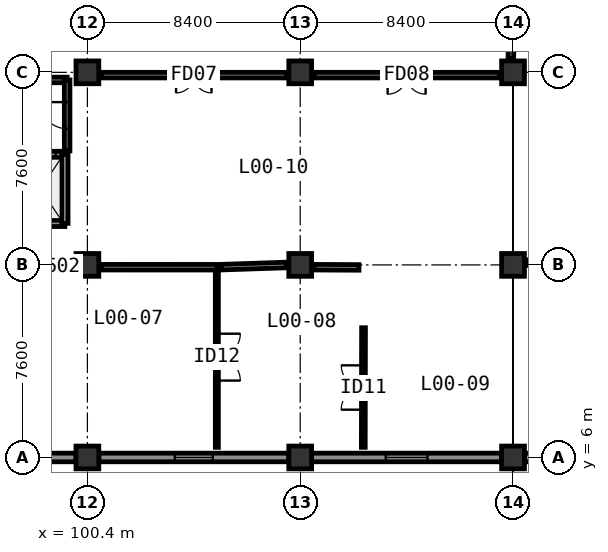
"""IFC4 building model, lengths in metres.
Left out: names, types, materials, properties, quantities, classifications, styles, units other than length and angle.
Written with IfcOpenShell. Run it as: python <this file> out.ifc"""

import sys

from ifc_helpers import new_model, si_unit, direction, frame, frame_2d, origin, origin_2d, place, context, subcontext, project, spatial, rectangle, extrude, element, fill, save


model = new_model("IFC4")
c1 = context("Model", 3, precision=1e-05, world=origin(), true_north=direction((0.0, 1.0)))
c2 = subcontext(c1, "Body", "Model", "MODEL_VIEW")
j1 = project(units=[si_unit("LENGTHUNIT", "METRE"), si_unit("PLANEANGLEUNIT", "RADIAN")], contexts=[c1])
p1 = place(None, origin())
s1 = spatial("IfcSite", under=j1, at=p1, CompositionType="ELEMENT")
p2 = place(p1, origin())
s2 = spatial("IfcBuilding", under=s1, at=p2, CompositionType="ELEMENT")
p3 = place(p2, origin())
s3 = spatial("IfcBuildingStorey", under=s2, at=p3, CompositionType="ELEMENT", Elevation=0.0)
for number, where, z_axis, x_axis in (
    (1, (100.4, 6.0, 0.0), (0.0, 0.0, 1.0), (1.0, 0.0, 0.0)),
    (2, (108.8, 6.0, 0.0), (0.0, 0.0, 1.0), (1.0, 0.0, 0.0)),
    (3, (117.2, 6.0, 0.0), (0.0, 0.0, 1.0), (1.0, 0.0, 0.0)),
    (4, (100.4, 13.6, 0.0), (0.0, 0.0, 1.0), (1.0, 0.0, 0.0)),
    (5, (108.8, 13.6, 0.0), (0.0, 0.0, 1.0), (1.0, 0.0, 0.0)),
    (6, (117.2, 13.6, 0.0), (0.0, 0.0, 1.0), (1.0, 0.0, 0.0)),
    (7, (100.4, 21.2, 0.0), (0.0, 0.0, 1.0), (1.0, 0.0, 0.0)),
    (8, (108.8, 21.2, 0.0), (0.0, 0.0, 1.0), (1.0, 0.0, 0.0)),
    (9, (117.2, 21.2, 0.0), (0.0, 0.0, 1.0), (1.0, 0.0, 0.0)),
):
    element("IfcColumn", number, at=place(p3, frame(where, z_axis=z_axis, x_axis=x_axis)), inside=s3, PredefinedType="COLUMN", context=c2, shape_type="SweptSolid", body=[
        extrude(rectangle(XDim=0.9, YDim=0.9, at=origin_2d()), origin(), (0.0, 0.0, 1.0), 4.8),
    ])
p4 = place(p3, frame((92.45, 6.0, 0.0), z_axis=(0.0, 0.0, 1.0), x_axis=(1.0, 0.0, 0.0)))
e10 = element("IfcWall", 10, at=p4, inside=s3, PredefinedType="SOLIDWALL", context=c2, shape_type="SweptSolid", body=[
    extrude(rectangle(XDim=7.5, YDim=0.34, at=frame_2d((3.75, 0.0))), origin(), (0.0, 0.0, 1.0), 4.5),
])
p5 = place(p4, frame((2.65, 0.0, 0.0)))
e11 = element("IfcOpeningElement", 11, at=p5, cuts=e10, PredefinedType="OPENING", context=c2, shape_type="SweptSolid", body=[
    extrude(rectangle(XDim=2.2, YDim=2.4, at=frame_2d((1.1, 1.2))), frame((0.0, 0.18, 0.0), z_axis=(0.0, -1.0, 0.0), x_axis=(1.0, 0.0, 0.0)), (0.0, 0.0, 1.0), 0.36),
])
p6 = place(p3, frame((100.85, 6.0, 0.0), z_axis=(0.0, 0.0, 1.0), x_axis=(1.0, 0.0, 0.0)))
e12 = element("IfcWall", 12, at=p6, inside=s3, PredefinedType="SOLIDWALL", context=c2, shape_type="SweptSolid", body=[
    extrude(rectangle(XDim=7.5, YDim=0.34, at=frame_2d((3.75, 0.0))), origin(), (0.0, 0.0, 1.0), 4.047),
])
p7 = place(p6, frame((3.0, 0.0, 0.95)))
e13 = element("IfcOpeningElement", 13, at=p7, cuts=e12, PredefinedType="OPENING", context=c2, shape_type="SweptSolid", body=[
    extrude(rectangle(XDim=1.5, YDim=1.5, at=frame_2d((0.75, 0.75))), frame((0.0, 0.18, 0.0), z_axis=(0.0, -1.0, 0.0), x_axis=(1.0, 0.0, 0.0)), (0.0, 0.0, 1.0), 0.36),
])
p8 = place(p3, frame((109.25, 6.0, 0.0), z_axis=(0.0, 0.0, 1.0), x_axis=(1.0, 0.0, 0.0)))
e14 = element("IfcWall", 14, at=p8, inside=s3, PredefinedType="SOLIDWALL", context=c2, shape_type="SweptSolid", body=[
    extrude(rectangle(XDim=7.5, YDim=0.34, at=frame_2d((3.75, 0.0))), origin(), (0.0, 0.0, 1.0), 4.047),
])
p9 = place(p8, frame((2.925, 0.0, 0.95)))
e15 = element("IfcOpeningElement", 15, at=p9, cuts=e14, PredefinedType="OPENING", context=c2, shape_type="SweptSolid", body=[
    extrude(rectangle(XDim=1.65, YDim=1.5, at=frame_2d((0.825, 0.75))), frame((0.0, 0.18, 0.0), z_axis=(0.0, -1.0, 0.0), x_axis=(1.0, 0.0, 0.0)), (0.0, 0.0, 1.0), 0.36),
])
p10 = place(p3, frame((117.65, 6.0, 0.0), z_axis=(0.0, 0.0, 1.0), x_axis=(1.0, 0.0, 0.0)))
e16 = element("IfcWall", 16, at=p10, inside=s3, PredefinedType="SOLIDWALL", context=c2, shape_type="SweptSolid", body=[
    extrude(rectangle(XDim=7.65, YDim=0.34, at=frame_2d((3.825, 0.0))), origin(), (0.0, 0.0, 1.0), 4.047),
])
p11 = place(p10, frame((2.925, 0.0, 0.95)))
e17 = element("IfcOpeningElement", 17, at=p11, cuts=e16, PredefinedType="OPENING", context=c2, shape_type="SweptSolid", body=[
    extrude(rectangle(XDim=1.8, YDim=1.5, at=frame_2d((0.9, 0.75))), frame((0.0, 0.18, 0.0), z_axis=(0.0, -1.0, 0.0), x_axis=(1.0, 0.0, 0.0)), (0.0, 0.0, 1.0), 0.36),
])
p12 = place(p3, frame((92.8, 20.9, 0.0), z_axis=(0.0, 0.0, 1.0), x_axis=(1.0, 0.0, 0.0)))
e18 = element("IfcWall", 18, at=p12, inside=s3, PredefinedType="SOLIDWALL", context=c2, shape_type="SweptSolid", body=[
    extrude(rectangle(XDim=6.8, YDim=0.22, at=frame_2d((3.4, 0.0))), origin(), (0.0, 0.0, 1.0), 4.5),
])
p13 = place(p12, frame((2.8, 0.0, 0.0)))
e19 = element("IfcOpeningElement", 19, at=p13, cuts=e18, PredefinedType="OPENING", context=c2, shape_type="SweptSolid", body=[
    extrude(rectangle(XDim=1.2, YDim=2.1, at=frame_2d((0.6, 1.05))), frame((0.0, 0.12, 0.0), z_axis=(0.0, -1.0, 0.0), x_axis=(1.0, 0.0, 0.0)), (0.0, 0.0, 1.0), 0.24),
])
p14 = place(p3, frame((99.6, 18.1, 0.0), z_axis=(0.0, 0.0, 1.0), x_axis=(0.0, 1.0, 0.0)))
e20 = element("IfcWall", 20, at=p14, inside=s3, PredefinedType="SOLIDWALL", context=c2, shape_type="SweptSolid", body=[
    extrude(rectangle(XDim=2.8, YDim=0.22, at=frame_2d((1.4, 0.0))), origin(), (0.0, 0.0, 1.0), 4.5),
])
p15 = place(p14, frame((0.875, 0.0, 0.0)))
e21 = element("IfcOpeningElement", 21, at=p15, cuts=e20, PredefinedType="OPENING", context=c2, shape_type="SweptSolid", body=[
    extrude(rectangle(XDim=1.05, YDim=2.1, at=frame_2d((0.525, 1.05))), frame((0.0, 0.12, 0.0), z_axis=(0.0, -1.0, 0.0), x_axis=(1.0, 0.0, 0.0)), (0.0, 0.0, 1.0), 0.24),
])
p16 = place(p3, frame((97.59, 15.24, 0.0), z_axis=(0.0, 0.0, 1.0), x_axis=(1.0, 0.0, 0.0)))
e22 = element("IfcWall", 22, at=p16, inside=s3, PredefinedType="SHEAR", context=c2, shape_type="SweptSolid", body=[
    extrude(rectangle(XDim=1.92, YDim=0.25, at=frame_2d((0.96, 0.0))), origin(), (0.0, 0.0, 1.0), 4.52),
])
p17 = place(p3, frame((97.59, 17.96, 0.0), z_axis=(0.0, 0.0, 1.0), x_axis=(1.0, 0.0, 0.0)))
e23 = element("IfcWall", 23, at=p17, inside=s3, PredefinedType="SHEAR", context=c2, shape_type="SweptSolid", body=[
    extrude(rectangle(XDim=1.92, YDim=0.25, at=frame_2d((0.96, 0.0))), origin(), (0.0, 0.0, 1.0), 4.52),
])
p18 = place(p17, frame((0.36, 0.0, 0.0)))
e24 = element("IfcOpeningElement", 24, at=p18, cuts=e23, PredefinedType="OPENING", context=c2, shape_type="SweptSolid", body=[
    extrude(rectangle(XDim=1.2, YDim=2.2, at=frame_2d((0.6, 1.1))), frame((0.0, 0.135, 0.0), z_axis=(0.0, -1.0, 0.0), x_axis=(1.0, 0.0, 0.0)), (0.0, 0.0, 1.0), 0.27),
])
p19 = place(p3, frame((99.51, 15.24, 0.0), z_axis=(0.0, 0.0, 1.0), x_axis=(0.0, 1.0, 0.0)))
e25 = element("IfcWall", 25, at=p19, inside=s3, PredefinedType="SHEAR", context=c2, shape_type="SweptSolid", body=[
    extrude(rectangle(XDim=2.72, YDim=0.25, at=frame_2d((1.36, 0.0))), origin(), (0.0, 0.0, 1.0), 4.52),
])
p20 = place(p3, frame((108.26, 21.09, 0.0), z_axis=(0.0, 0.0, 1.0), x_axis=(-1.0, 0.0, 0.0)))
e26 = element("IfcWall", 26, at=p20, inside=s3, PredefinedType="SOLIDWALL", context=c2, shape_type="SweptSolid", body=[
    extrude(rectangle(XDim=7.32, YDim=0.22, at=frame_2d((3.66, 0.0))), origin(), (0.0, 0.0, 1.0), 3.81),
])
p21 = place(p20, frame((2.96, 0.0, 0.0)))
e27 = element("IfcOpeningElement", 27, at=p21, cuts=e26, PredefinedType="OPENING", context=c2, shape_type="SweptSolid", body=[
    extrude(rectangle(XDim=1.4, YDim=2.15, at=frame_2d((0.7, 1.075))), frame((0.0, 0.12, 0.0), z_axis=(0.0, -1.0, 0.0), x_axis=(1.0, 0.0, 0.0)), (0.0, 0.0, 1.0), 0.24),
])
p22 = place(p3, frame((116.66, 21.09, 0.0), z_axis=(0.0, 0.0, 1.0), x_axis=(-1.0, 0.0, 0.0)))
e28 = element("IfcWall", 28, at=p22, inside=s3, PredefinedType="SOLIDWALL", context=c2, shape_type="SweptSolid", body=[
    extrude(rectangle(XDim=7.32, YDim=0.22, at=frame_2d((3.66, 0.0))), origin(), (0.0, 0.0, 1.0), 3.81),
])
p23 = place(p22, frame((2.91, 0.0, 0.0)))
e29 = element("IfcOpeningElement", 29, at=p23, cuts=e28, PredefinedType="OPENING", context=c2, shape_type="SweptSolid", body=[
    extrude(rectangle(XDim=1.5, YDim=2.15, at=frame_2d((0.75, 1.075))), frame((0.0, 0.12, 0.0), z_axis=(0.0, -1.0, 0.0), x_axis=(1.0, 0.0, 0.0)), (0.0, 0.0, 1.0), 0.24),
])
p24 = place(p3, frame((117.198, 24.32, 0.0), z_axis=(0.0, 0.0, 1.0), x_axis=(-0.032911759551, -0.999458261301, 0.0)))
e30 = element("IfcWall", 30, at=p24, inside=s3, PredefinedType="SOLIDWALL", context=c2, shape_type="SweptSolid", body=[
    extrude(rectangle(XDim=2.582, YDim=0.22, at=frame_2d((1.291, 0.0))), origin(), (0.0, 0.0, 1.0), 3.81),
])
p25 = place(p24, frame((0.841, 0.0, 0.0)))
e31 = element("IfcOpeningElement", 31, at=p25, cuts=e30, PredefinedType="OPENING", context=c2, shape_type="SweptSolid", body=[
    extrude(rectangle(XDim=0.9, YDim=2.1, at=frame_2d((0.45, 1.05))), frame((0.0, 0.12, 0.0), z_axis=(0.0, -1.0, 0.0), x_axis=(1.0, 0.0, 0.0)), (0.0, 0.0, 1.0), 0.24),
])
p26 = place(p3, frame((125.135, 13.69, 0.0), z_axis=(0.0, 0.0, 1.0), x_axis=(-1.0, 0.0, 0.0)))
e32 = element("IfcWall", 32, at=p26, inside=s3, PredefinedType="SOLIDWALL", context=c2, shape_type="SweptSolid", body=[
    extrude(rectangle(XDim=7.395, YDim=0.22, at=frame_2d((3.698, 0.0))), origin(), (0.0, 0.0, 1.0), 3.81),
])
p27 = place(p26, frame((2.748, 0.0, 0.0)))
e33 = element("IfcOpeningElement", 33, at=p27, cuts=e32, PredefinedType="OPENING", context=c2, shape_type="SweptSolid", body=[
    extrude(rectangle(XDim=1.9, YDim=2.2, at=frame_2d((0.95, 1.1))), frame((0.0, 0.12, 0.0), z_axis=(0.0, -1.0, 0.0), x_axis=(1.0, 0.0, 0.0)), (0.0, 0.0, 1.0), 0.24),
])
p28 = place(p3, frame((111.29, 6.4, 0.0), z_axis=(0.0, 0.0, 1.0), x_axis=(0.001965445671, 0.99999806851, 0.0)))
e34 = element("IfcWall", 34, at=p28, inside=s3, PredefinedType="PARTITIONING", context=c2, shape_type="SweptSolid", body=[
    extrude(rectangle(XDim=4.72, YDim=0.15, at=frame_2d((2.36, 0.0))), origin(), (0.0, 0.0, 1.0), 4.5),
])
p29 = place(p28, frame((1.485, 0.0, 0.0)))
e35 = element("IfcOpeningElement", 35, at=p29, cuts=e34, PredefinedType="OPENING", context=c2, shape_type="SweptSolid", body=[
    extrude(rectangle(XDim=1.75, YDim=2.22, at=frame_2d((0.875, 1.11))), frame((0.0, 0.085, 0.0), z_axis=(0.0, -1.0, 0.0), x_axis=(1.0, 0.0, 0.0)), (0.0, 0.0, 1.0), 0.17),
])
p30 = place(p3, frame((105.51, 13.52, 0.0), z_axis=(0.0, 0.0, 1.0), x_axis=(0.0, -1.0, 0.0)))
e36 = element("IfcWall", 36, at=p30, inside=s3, PredefinedType="PARTITIONING", context=c2, shape_type="SweptSolid", body=[
    extrude(rectangle(XDim=7.12, YDim=0.12, at=frame_2d((3.56, 0.0))), origin(), (0.0, 0.0, 1.0), 4.5),
])
p31 = place(p30, frame((2.635, 0.0, 0.0)))
e37 = element("IfcOpeningElement", 37, at=p31, cuts=e36, PredefinedType="OPENING", context=c2, shape_type="SweptSolid", body=[
    extrude(rectangle(XDim=1.85, YDim=2.22, at=frame_2d((0.925, 1.11))), frame((0.0, 0.07, 0.0), z_axis=(0.0, -1.0, 0.0), x_axis=(1.0, 0.0, 0.0)), (0.0, 0.0, 1.0), 0.14),
])
p32 = place(p3, frame((100.94, 13.51, 0.0), z_axis=(0.0, 0.0, 1.0), x_axis=(0.999999964482, -0.000266524511, 0.0)))
e38 = element("IfcWall", 38, at=p32, inside=s3, PredefinedType="SOLIDWALL", context=c2, shape_type="SweptSolid", body=[
    extrude(rectangle(XDim=4.58, YDim=0.22, at=frame_2d((2.29, 0.0))), origin(), (0.0, 0.0, 1.0), 3.81),
])
p33 = place(p3, frame((105.69, 13.511, 0.0), z_axis=(0.0, 0.0, 1.0), x_axis=(0.999441424237, 0.033419148982, 0.0)))
e39 = element("IfcWall", 39, at=p33, inside=s3, PredefinedType="SOLIDWALL", context=c2, shape_type="SweptSolid", body=[
    extrude(rectangle(XDim=2.572, YDim=0.22, at=frame_2d((1.286, 0.0))), origin(), (0.0, 0.0, 1.0), 3.81),
])
p34 = place(p3, frame((109.34, 13.51, 0.0), z_axis=(0.0, 0.0, 1.0), x_axis=(0.999988478092, -0.004800383587, 0.0)))
e40 = element("IfcWall", 40, at=p34, inside=s3, PredefinedType="SOLIDWALL", context=c2, shape_type="SweptSolid", body=[
    extrude(rectangle(XDim=1.78, YDim=0.22, at=frame_2d((0.89, 0.0))), origin(), (0.0, 0.0, 1.0), 3.81),
])
p35 = place(p7, origin())
e41 = element("IfcWindow", 41, at=p35, inside=s3, PartitioningType="SINGLE_PANEL", PredefinedType="WINDOW", context=c2, shape_type="SweptSolid", body=[
    extrude(rectangle(XDim=1.5, YDim=1.5, at=frame_2d((0.75, 0.75))), frame((0.0, 0.03, 0.0), z_axis=(0.0, -1.0, 0.0), x_axis=(1.0, 0.0, 0.0)), (0.0, 0.0, 1.0), 0.06),
])
fill(e13, e41)
p36 = place(p9, origin())
e42 = element("IfcWindow", 42, at=p36, inside=s3, PartitioningType="SINGLE_PANEL", PredefinedType="WINDOW", context=c2, shape_type="SweptSolid", body=[
    extrude(rectangle(XDim=1.65, YDim=1.5, at=frame_2d((0.825, 0.75))), frame((0.0, 0.03, 0.0), z_axis=(0.0, -1.0, 0.0), x_axis=(1.0, 0.0, 0.0)), (0.0, 0.0, 1.0), 0.06),
])
fill(e15, e42)
p37 = place(p15, origin())
e43 = element("IfcDoor", 43, at=p37, inside=s3, OperationType="SINGLE_SWING_RIGHT", PredefinedType="DOOR", context=c2, shape_type="SweptSolid", body=[
    extrude(rectangle(XDim=1.05, YDim=2.1, at=frame_2d((0.525, 1.05))), frame((0.0, 0.025, 0.0), z_axis=(0.0, -1.0, 0.0), x_axis=(1.0, 0.0, 0.0)), (0.0, 0.0, 1.0), 0.05),
])
fill(e21, e43)
p38 = place(p18, origin())
e44 = element("IfcDoor", 44, at=p38, inside=s3, OperationType="SLIDING_TO_LEFT", PredefinedType="DOOR", context=c2, shape_type="SweptSolid", body=[
    extrude(rectangle(XDim=1.2, YDim=2.2, at=frame_2d((0.6, 1.1))), frame((0.0, 0.025, 0.0), z_axis=(0.0, -1.0, 0.0), x_axis=(1.0, 0.0, 0.0)), (0.0, 0.0, 1.0), 0.05),
])
fill(e24, e44)
p39 = place(p21, origin())
e45 = element("IfcDoor", 45, at=p39, inside=s3, OperationType="DOUBLE_DOOR_SINGLE_SWING", PredefinedType="DOOR", context=c2, shape_type="SweptSolid", body=[
    extrude(rectangle(XDim=1.4, YDim=2.15, at=frame_2d((0.7, 1.075))), frame((0.0, 0.025, 0.0), z_axis=(0.0, -1.0, 0.0), x_axis=(1.0, 0.0, 0.0)), (0.0, 0.0, 1.0), 0.05),
])
fill(e27, e45)
p40 = place(p23, origin())
e46 = element("IfcDoor", 46, at=p40, inside=s3, OperationType="DOUBLE_DOOR_SINGLE_SWING", PredefinedType="DOOR", context=c2, shape_type="SweptSolid", body=[
    extrude(rectangle(XDim=1.5, YDim=2.15, at=frame_2d((0.75, 1.075))), frame((0.0, 0.025, 0.0), z_axis=(0.0, -1.0, 0.0), x_axis=(1.0, 0.0, 0.0)), (0.0, 0.0, 1.0), 0.05),
])
fill(e29, e46)
p41 = place(p29, origin())
e47 = element("IfcDoor", 47, at=p41, inside=s3, OperationType="DOUBLE_DOOR_SINGLE_SWING", PredefinedType="DOOR", context=c2, shape_type="SweptSolid", body=[
    extrude(rectangle(XDim=1.75, YDim=2.22, at=frame_2d((0.875, 1.11))), frame((0.0, 0.025, 0.0), z_axis=(0.0, -1.0, 0.0), x_axis=(1.0, 0.0, 0.0)), (0.0, 0.0, 1.0), 0.05),
])
fill(e35, e47)
p42 = place(p31, origin())
e48 = element("IfcDoor", 48, at=p42, inside=s3, OperationType="DOUBLE_DOOR_SINGLE_SWING", PredefinedType="DOOR", context=c2, shape_type="SweptSolid", body=[
    extrude(rectangle(XDim=1.85, YDim=2.22, at=frame_2d((0.925, 1.11))), frame((0.0, 0.025, 0.0), z_axis=(0.0, -1.0, 0.0), x_axis=(1.0, 0.0, 0.0)), (0.0, 0.0, 1.0), 0.05),
])
fill(e37, e48)
save(model, sys.argv[1])
